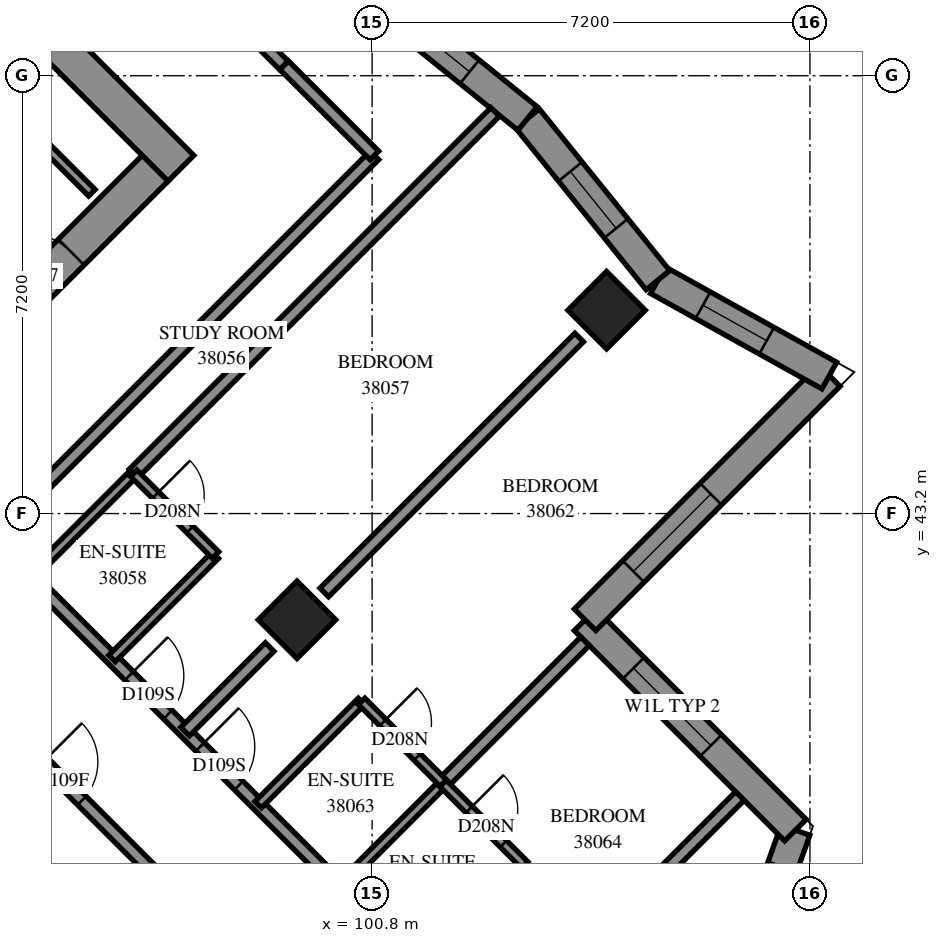
"""IFC4 building model, lengths in metres.
Left out: names, types, materials, properties, quantities, classifications, styles, units other than length and angle.
Written with IfcOpenShell. Run it as: python <this file> out.ifc"""

import sys

from ifc_helpers import new_model, si_unit, direction, frame, frame_2d, origin, origin_2d, place, context, subcontext, project, spatial, polyline, rectangle, outline, extrude, element, fill, save


model = new_model("IFC4")
c1 = context("Model", 3, precision=1e-05, world=origin(), true_north=direction((0.0, 1.0)))
c2 = subcontext(c1, "Body", "Model", "MODEL_VIEW")
j1 = project(units=[si_unit("LENGTHUNIT", "METRE"), si_unit("PLANEANGLEUNIT", "RADIAN")], contexts=[c1])
p1 = place(None, origin())
s1 = spatial("IfcSite", under=j1, at=p1, CompositionType="ELEMENT")
p2 = place(p1, origin())
s2 = spatial("IfcBuilding", under=s1, at=p2, CompositionType="ELEMENT")
p3 = place(p2, frame((0.0, 0.0, 142.2)))
s3 = spatial("IfcBuildingStorey", under=s2, at=p3, CompositionType="ELEMENT", Elevation=142.2)
for number, where, z_axis, x_axis in (
    (1, (104.656, 46.544, 0.0), (0.0, 0.0, 1.0), (0.707, -0.707, 0.0)),
    (2, (99.565, 41.453, 0.0), (0.0, 0.0, 1.0), (0.707, -0.707, 0.0)),
):
    element("IfcColumn", number, at=place(p3, frame(where, z_axis=z_axis, x_axis=x_axis)), inside=s3, PredefinedType="COLUMN", context=c2, shape_type="SweptSolid", body=[
        extrude(rectangle(XDim=0.9, YDim=0.9, at=origin_2d()), origin(), (0.0, 0.0, 1.0), 3.1),
    ])
p4 = place(p3, frame((86.625, 59.908, -0.3), z_axis=(0.0, 0.0, 1.0), x_axis=(0.7071067812, -0.7071067812, 0.0)))
e3 = element("IfcWall", 3, at=p4, inside=s3, PredefinedType="SHEAR", context=c2, shape_type="SweptSolid", body=[
    extrude(rectangle(XDim=15.6, YDim=0.6, at=frame_2d((7.8, 0.0))), origin(), (0.0, 0.0, 1.0), 2.7),
])
p5 = place(p4, frame((10.6, 0.0, 0.3)))
e4 = element("IfcOpeningElement", 4, at=p5, cuts=e3, PredefinedType="OPENING", context=c2, shape_type="SweptSolid", body=[
    extrude(rectangle(XDim=0.8, YDim=2.1, at=frame_2d((0.4, 1.05))), frame((0.0, 0.31, 0.0), z_axis=(0.0, -1.0, 0.0), x_axis=(1.0, 0.0, 0.0)), (0.0, 0.0, 1.0), 0.62),
])
p6 = place(p3, frame((87.049, 38.695, -0.3), z_axis=(0.0, 0.0, 1.0), x_axis=(0.7071067812, 0.7071067812, 0.0)))
e5 = element("IfcWall", 5, at=p6, inside=s3, PredefinedType="SHEAR", context=c2, shape_type="SweptSolid", body=[
    extrude(rectangle(XDim=14.4, YDim=0.6, at=frame_2d((7.2, 0.0))), origin(), (0.0, 0.0, 1.0), 2.7),
])
p7 = place(p6, frame((4.55, 0.0, 0.3)))
e6 = element("IfcOpeningElement", 6, at=p7, cuts=e5, PredefinedType="OPENING", context=c2, shape_type="SweptSolid", body=[
    extrude(rectangle(XDim=1.1, YDim=2.1, at=frame_2d((0.55, 1.05))), frame((0.0, 0.31, 0.0), z_axis=(0.0, -1.0, 0.0), x_axis=(1.0, 0.0, 0.0)), (0.0, 0.0, 1.0), 0.62),
])
p8 = place(p6, frame((11.35, 0.0, 0.3)))
e7 = element("IfcOpeningElement", 7, at=p8, cuts=e5, PredefinedType="OPENING", context=c2, shape_type="SweptSolid", body=[
    extrude(rectangle(XDim=1.1, YDim=2.1, at=frame_2d((0.55, 1.05))), frame((0.0, 0.31, 0.0), z_axis=(0.0, -1.0, 0.0), x_axis=(1.0, 0.0, 0.0)), (0.0, 0.0, 1.0), 0.62),
])
p9 = place(p3, frame((105.986, 32.989, 0.0), z_axis=(0.0, 0.0, 1.0), x_axis=(0.3344271092, 0.9424216194, 0.0)))
e8 = element("IfcWall", 8, at=p9, inside=s3, PredefinedType="SOLIDWALL", context=c2, shape_type="SweptSolid", body=[
    extrude(outline(polyline([(-0.114, -0.25), (5.468, -0.25), (5.153, 0.25), (0.114, 0.25), (-0.114, -0.25)])), origin(), (0.0, 0.0, 1.0), 3.1),
])
p10 = place(p9, frame((1.155, 0.0, 0.45)))
e9 = element("IfcOpeningElement", 9, at=p10, cuts=e8, PredefinedType="OPENING", context=c2, shape_type="SweptSolid", body=[
    extrude(rectangle(XDim=1.2, YDim=2.5, at=frame_2d((0.6, 1.25))), frame((0.0, 0.26, 0.0), z_axis=(0.0, -1.0, 0.0), x_axis=(1.0, 0.0, 0.0)), (0.0, 0.0, 1.0), 0.52),
])
p11 = place(p9, frame((3.474, 0.0, 0.45)))
e10 = element("IfcOpeningElement", 10, at=p11, cuts=e8, PredefinedType="OPENING", context=c2, shape_type="SweptSolid", body=[
    extrude(rectangle(XDim=1.2, YDim=2.5, at=frame_2d((0.6, 1.25))), frame((0.0, 0.26, 0.0), z_axis=(0.0, -1.0, 0.0), x_axis=(1.0, 0.0, 0.0)), (0.0, 0.0, 1.0), 0.52),
])
p12 = place(p3, frame((107.762, 37.994, 0.0), z_axis=(0.0, 0.0, 1.0), x_axis=(-0.7071170013, 0.7070965609, 0.0)))
e11 = element("IfcWall", 11, at=p12, inside=s3, PredefinedType="SOLIDWALL", context=c2, shape_type="SweptSolid", body=[
    extrude(outline(polyline([(-0.158, -0.25), (4.642, -0.25), (5.142, 0.25), (0.158, 0.25), (-0.158, -0.25)])), origin(), (0.0, 0.0, 1.0), 3.1),
])
p13 = place(p12, frame((1.967, 0.0, 0.6)))
e12 = element("IfcOpeningElement", 12, at=p13, cuts=e11, PredefinedType="OPENING", context=c2, shape_type="SweptSolid", body=[
    extrude(rectangle(XDim=1.8, YDim=1.9, at=frame_2d((0.9, 0.95))), frame((0.0, 0.26, 0.0), z_axis=(0.0, -1.0, 0.0), x_axis=(1.0, 0.0, 0.0)), (0.0, 0.0, 1.0), 0.52),
])
p14 = place(p3, frame((104.302, 41.453, 0.0), z_axis=(0.0, 0.0, 1.0), x_axis=(0.707115584, 0.7070979783, 0.0)))
e13 = element("IfcWall", 13, at=p14, inside=s3, PredefinedType="SOLIDWALL", context=c2, shape_type="SweptSolid", body=[
    extrude(outline(polyline([(0.25, -0.25), (6.011, -0.25), (5.349, 0.25), (-0.25, 0.25), (0.25, -0.25)])), origin(), (0.0, 0.0, 1.0), 3.1),
])
p15 = place(p14, frame((1.125, 0.0, 0.6)))
e14 = element("IfcOpeningElement", 14, at=p15, cuts=e13, PredefinedType="OPENING", context=c2, shape_type="SweptSolid", body=[
    extrude(rectangle(XDim=1.8, YDim=1.9, at=frame_2d((0.9, 0.95))), frame((0.0, 0.26, 0.0), z_axis=(0.0, -1.0, 0.0), x_axis=(1.0, 0.0, 0.0)), (0.0, 0.0, 1.0), 0.52),
])
p16 = place(p3, frame((108.319, 45.469, 0.0), z_axis=(0.0, 0.0, 1.0), x_axis=(-0.8737431929, 0.4863875336, 0.0)))
e15 = element("IfcWall", 15, at=p16, inside=s3, PredefinedType="SOLIDWALL", context=c2, shape_type="SweptSolid", body=[
    extrude(outline(polyline([(-0.331, -0.25), (3.178, -0.25), (3.275, 0.25), (0.331, 0.25), (-0.331, -0.25)])), origin(), (0.0, 0.0, 1.0), 3.1),
])
p17 = place(p16, frame((1.179, 0.0, 0.45)))
e16 = element("IfcOpeningElement", 16, at=p17, cuts=e15, PredefinedType="OPENING", context=c2, shape_type="SweptSolid", body=[
    extrude(rectangle(XDim=1.2, YDim=2.5, at=frame_2d((0.6, 1.25))), frame((0.0, 0.26, 0.0), z_axis=(0.0, -1.0, 0.0), x_axis=(1.0, 0.0, 0.0)), (0.0, 0.0, 1.0), 0.52),
])
p18 = place(p3, frame((105.5, 47.038, 0.0), z_axis=(0.0, 0.0, 1.0), x_axis=(-0.6278674651, 0.7783202723, 0.0)))
e17 = element("IfcWall", 17, at=p18, inside=s3, PredefinedType="SOLIDWALL", context=c2, shape_type="SweptSolid", body=[
    extrude(outline(polyline([(0.049, -0.25), (3.442, -0.25), (3.389, 0.25), (-0.049, 0.25), (0.049, -0.25)])), origin(), (0.0, 0.0, 1.0), 3.1),
])
p19 = place(p18, frame((1.095, 0.0, 0.45)))
e18 = element("IfcOpeningElement", 18, at=p19, cuts=e17, PredefinedType="OPENING", context=c2, shape_type="SweptSolid", body=[
    extrude(rectangle(XDim=1.2, YDim=2.5, at=frame_2d((0.6, 1.25))), frame((0.0, 0.26, 0.0), z_axis=(0.0, -1.0, 0.0), x_axis=(1.0, 0.0, 0.0)), (0.0, 0.0, 1.0), 0.52),
])
p20 = place(p3, frame((103.355, 49.697, 0.0), z_axis=(0.0, 0.0, 1.0), x_axis=(-0.7783182818, 0.6278699325, 0.0)))
e19 = element("IfcWall", 19, at=p20, inside=s3, PredefinedType="SOLIDWALL", context=c2, shape_type="SweptSolid", body=[
    extrude(outline(polyline([(-0.027, -0.25), (3.367, -0.25), (3.421, 0.25), (0.027, 0.25), (-0.027, -0.25)])), origin(), (0.0, 0.0, 1.0), 3.1),
])
p21 = place(p20, frame((1.224, 0.0, 0.45)))
e20 = element("IfcOpeningElement", 20, at=p21, cuts=e19, PredefinedType="OPENING", context=c2, shape_type="SweptSolid", body=[
    extrude(rectangle(XDim=1.2, YDim=2.5, at=frame_2d((0.6, 1.25))), frame((0.0, 0.26, 0.0), z_axis=(0.0, -1.0, 0.0), x_axis=(1.0, 0.0, 0.0)), (0.0, 0.0, 1.0), 0.52),
])
p22 = place(p3, frame((91.313, 53.354, 0.0), z_axis=(0.0, 0.0, 1.0), x_axis=(0.7071140275, -0.7070995348, 0.0)))
e21 = element("IfcWall", 21, at=p22, inside=s3, PredefinedType="PARTITIONING", context=c2, shape_type="SweptSolid", body=[
    extrude(rectangle(XDim=6.9, YDim=0.15, at=frame_2d((3.45, 0.0))), origin(), (0.0, 0.0, 1.0), 3.1),
])
p23 = place(p3, frame((93.127, 41.379, 0.0), z_axis=(0.0, 0.0, 1.0), x_axis=(0.7071067812, -0.7071067812, 0.0)))
e22 = element("IfcWall", 22, at=p23, inside=s3, PredefinedType="PARTITIONING", context=c2, shape_type="SweptSolid", body=[
    extrude(rectangle(XDim=9.39, YDim=0.2, at=frame_2d((4.695, 0.0))), origin(), (0.0, 0.0, 1.0), 3.1),
])
p24 = place(p23, frame((3.2, 0.0, 0.0)))
e23 = element("IfcOpeningElement", 23, at=p24, cuts=e22, PredefinedType="OPENING", context=c2, shape_type="SweptSolid", body=[
    extrude(rectangle(XDim=0.9, YDim=2.1, at=frame_2d((0.45, 1.05))), frame((0.0, 0.11, 0.0), z_axis=(0.0, -1.0, 0.0), x_axis=(1.0, 0.0, 0.0)), (0.0, 0.0, 1.0), 0.22),
])
p25 = place(p3, frame((94.543, 42.797, 0.0), z_axis=(0.0, 0.0, 1.0), x_axis=(0.7071067812, 0.7071067812, 0.0)))
e24 = element("IfcWall", 24, at=p25, inside=s3, PredefinedType="PARTITIONING", context=c2, shape_type="SweptSolid", body=[
    extrude(rectangle(XDim=8.901, YDim=0.2, at=frame_2d((4.45, 0.0))), origin(), (0.0, 0.0, 1.0), 3.1),
])
p26 = place(p25, frame((0.193, 0.0, 0.0)))
e25 = element("IfcOpeningElement", 25, at=p26, cuts=e24, PredefinedType="OPENING", context=c2, shape_type="SweptSolid", body=[
    extrude(rectangle(XDim=1.0, YDim=2.1, at=frame_2d((0.5, 1.05))), frame((0.0, 0.11, 0.0), z_axis=(0.0, -1.0, 0.0), x_axis=(1.0, 0.0, 0.0)), (0.0, 0.0, 1.0), 0.22),
])
p27 = place(p3, frame((95.177, 42.157, 0.0), z_axis=(0.0, 0.0, 1.0), x_axis=(0.7071067812, -0.7071067812, 0.0)))
e26 = element("IfcWall", 26, at=p27, inside=s3, PredefinedType="PARTITIONING", context=c2, shape_type="SweptSolid", body=[
    extrude(rectangle(XDim=8.491, YDim=0.2, at=frame_2d((4.245, 0.0))), origin(), (0.0, 0.0, 1.0), 3.1),
])
p28 = place(p27, frame((2.3, 0.0, 0.0)))
e27 = element("IfcOpeningElement", 27, at=p28, cuts=e26, PredefinedType="OPENING", context=c2, shape_type="SweptSolid", body=[
    extrude(rectangle(XDim=0.9, YDim=2.1, at=frame_2d((0.45, 1.05))), frame((0.0, 0.11, 0.0), z_axis=(0.0, -1.0, 0.0), x_axis=(1.0, 0.0, 0.0)), (0.0, 0.0, 1.0), 0.22),
])
p29 = place(p27, frame((3.95, 0.0, 0.0)))
e28 = element("IfcOpeningElement", 28, at=p29, cuts=e26, PredefinedType="OPENING", context=c2, shape_type="SweptSolid", body=[
    extrude(rectangle(XDim=0.9, YDim=2.1, at=frame_2d((0.45, 1.05))), frame((0.0, 0.11, 0.0), z_axis=(0.0, -1.0, 0.0), x_axis=(1.0, 0.0, 0.0)), (0.0, 0.0, 1.0), 0.22),
])
p30 = place(p3, frame((96.877, 43.859, 0.0), z_axis=(0.0, 0.0, 1.0), x_axis=(0.7071127272, 0.7071008351, 0.0)))
e29 = element("IfcWall", 29, at=p30, inside=s3, PredefinedType="PARTITIONING", context=c2, shape_type="SweptSolid", body=[
    extrude(rectangle(XDim=8.409, YDim=0.2, at=frame_2d((4.205, 0.0))), origin(), (0.0, 0.0, 1.0), 3.1),
])
p31 = place(p3, frame((100.013, 41.903, 0.0), z_axis=(0.0, 0.0, 1.0), x_axis=(0.7071067812, 0.7071067812, 0.0)))
e30 = element("IfcWall", 30, at=p31, inside=s3, PredefinedType="PARTITIONING", context=c2, shape_type="SweptSolid", body=[
    extrude(rectangle(XDim=5.928, YDim=0.2, at=frame_2d((2.964, 0.0))), origin(), (0.0, 0.0, 1.0), 3.1),
])
p32 = place(p3, frame((101.968, 38.766, 0.0), z_axis=(0.0, 0.0, 1.0), x_axis=(0.7071067812, 0.7071067812, 0.0)))
e31 = element("IfcWall", 31, at=p32, inside=s3, PredefinedType="PARTITIONING", context=c2, shape_type="SweptSolid", body=[
    extrude(rectangle(XDim=3.3, YDim=0.2, at=frame_2d((1.65, 0.0))), origin(), (0.0, 0.0, 1.0), 3.1),
])
p33 = place(p3, frame((105.105, 36.813, 0.0), z_axis=(0.0, 0.0, 1.0), x_axis=(0.7071067812, 0.7071067812, 0.0)))
e32 = element("IfcWall", 32, at=p33, inside=s3, PredefinedType="PARTITIONING", context=c2, shape_type="SweptSolid", body=[
    extrude(rectangle(XDim=2.463, YDim=0.2, at=frame_2d((1.232, 0.0))), origin(), (0.0, 0.0, 1.0), 3.1),
])
for number, where, z_axis, x_axis in (
    (33, (96.523, 40.817, 0.0), (0.0, 0.0, 1.0), (0.707, 0.707, 0.0)),
    (34, (98.927, 38.413, 0.0), (0.0, 0.0, 1.0), (0.707, 0.707, 0.0)),
    (35, (95.179, 42.161, 0.0), (0.0, 0.0, 1.0), (0.707, 0.707, 0.0)),
):
    element("IfcWall", number, at=place(p3, frame(where, z_axis=z_axis, x_axis=x_axis)), inside=s3, PredefinedType="PARTITIONING", context=c2, shape_type="SweptSolid", body=[
        extrude(rectangle(XDim=2.401, YDim=0.15, at=frame_2d((1.201, 0.0))), origin(), (0.0, 0.0, 1.0), 3.1),
    ])
p34 = place(p3, frame((100.273, 37.067, 0.0), z_axis=(0.0, 0.0, 1.0), x_axis=(0.706689978, 0.7075233388, 0.0)))
e36 = element("IfcWall", 36, at=p34, inside=s3, PredefinedType="PARTITIONING", context=c2, shape_type="SweptSolid", body=[
    extrude(rectangle(XDim=2.4, YDim=0.15, at=frame_2d((1.2, 0.0))), origin(), (0.0, 0.0, 1.0), 3.1),
])
p35 = place(p3, frame((101.615, 35.727, 0.0), z_axis=(0.0, 0.0, 1.0), x_axis=(0.7071067812, 0.7071067812, 0.0)))
e37 = element("IfcWall", 37, at=p35, inside=s3, PredefinedType="PARTITIONING", context=c2, shape_type="SweptSolid", body=[
    extrude(rectangle(XDim=2.398, YDim=0.15, at=frame_2d((1.199, 0.0))), origin(), (0.0, 0.0, 1.0), 3.1),
])
p36 = place(p3, frame((99.352, 50.574, 0.0), z_axis=(0.0, 0.0, 1.0), x_axis=(0.7075827869, -0.7066304548, 0.0)))
e38 = element("IfcWall", 38, at=p36, inside=s3, PredefinedType="PARTITIONING", context=c2, shape_type="SweptSolid", body=[
    extrude(rectangle(XDim=2.1, YDim=0.2, at=frame_2d((1.05, 0.0))), origin(), (0.0, 0.0, 1.0), 3.1),
])
p37 = place(p3, frame((97.725, 39.615, 0.0), z_axis=(0.0, 0.0, 1.0), x_axis=(0.7071067812, 0.7071067812, 0.0)))
e39 = element("IfcWall", 39, at=p37, inside=s3, PredefinedType="PARTITIONING", context=c2, shape_type="SweptSolid", body=[
    extrude(rectangle(XDim=1.966, YDim=0.2, at=frame_2d((0.983, 0.0))), origin(), (0.0, 0.0, 1.0), 3.1),
])
p38 = place(p3, frame((96.881, 43.861, 0.0), z_axis=(0.0, 0.0, 1.0), x_axis=(0.7071067812, -0.7071067812, 0.0)))
e40 = element("IfcWall", 40, at=p38, inside=s3, PredefinedType="PARTITIONING", context=c2, shape_type="SweptSolid", body=[
    extrude(rectangle(XDim=1.901, YDim=0.15, at=frame_2d((0.95, 0.0))), origin(), (0.0, 0.0, 1.0), 3.1),
])
p39 = place(p38, frame((0.505, 0.0, 0.0)))
e41 = element("IfcOpeningElement", 41, at=p39, cuts=e40, PredefinedType="OPENING", context=c2, shape_type="SweptSolid", body=[
    extrude(rectangle(XDim=0.8, YDim=2.1, at=frame_2d((0.4, 1.05))), frame((0.0, 0.085, 0.0), z_axis=(0.0, -1.0, 0.0), x_axis=(1.0, 0.0, 0.0)), (0.0, 0.0, 1.0), 0.17),
])
p40 = place(p3, frame((101.965, 38.763, 0.0), z_axis=(0.0, 0.0, 1.0), x_axis=(0.7071067812, -0.7071067812, 0.0)))
e42 = element("IfcWall", 42, at=p40, inside=s3, PredefinedType="PARTITIONING", context=c2, shape_type="SweptSolid", body=[
    extrude(rectangle(XDim=1.901, YDim=0.15, at=frame_2d((0.95, 0.0))), origin(), (0.0, 0.0, 1.0), 3.1),
])
p41 = place(p40, frame((0.608, 0.0, 0.0)))
e43 = element("IfcOpeningElement", 43, at=p41, cuts=e42, PredefinedType="OPENING", context=c2, shape_type="SweptSolid", body=[
    extrude(rectangle(XDim=0.8, YDim=2.1, at=frame_2d((0.4, 1.05))), frame((0.0, 0.085, 0.0), z_axis=(0.0, -1.0, 0.0), x_axis=(1.0, 0.0, 0.0)), (0.0, 0.0, 1.0), 0.17),
])
p42 = place(p3, frame((100.628, 40.112, 0.0), z_axis=(0.0, 0.0, 1.0), x_axis=(0.7065800724, -0.7076330979, 0.0)))
e44 = element("IfcWall", 44, at=p42, inside=s3, PredefinedType="PARTITIONING", context=c2, shape_type="SweptSolid", body=[
    extrude(rectangle(XDim=1.899, YDim=0.15, at=frame_2d((0.95, 0.0))), origin(), (0.0, 0.0, 1.0), 3.1),
])
p43 = place(p42, frame((0.493, 0.0, 0.0)))
e45 = element("IfcOpeningElement", 45, at=p43, cuts=e44, PredefinedType="OPENING", context=c2, shape_type="SweptSolid", body=[
    extrude(rectangle(XDim=0.8, YDim=2.1, at=frame_2d((0.4, 1.05))), frame((0.0, 0.085, 0.0), z_axis=(0.0, -1.0, 0.0), x_axis=(1.0, 0.0, 0.0)), (0.0, 0.0, 1.0), 0.17),
])
p44 = place(p3, frame((98.925, 50.995, 0.0), z_axis=(0.0, 0.0, 1.0), x_axis=(0.7071067812, -0.7071067812, 0.0)))
e46 = element("IfcWall", 46, at=p44, inside=s3, PredefinedType="PARTITIONING", context=c2, shape_type="SweptSolid", body=[
    extrude(rectangle(XDim=0.6, YDim=0.2, at=frame_2d((0.3, 0.0))), origin(), (0.0, 0.0, 1.0), 3.1),
])
p45 = place(p11, origin())
e47 = element("IfcWindow", 47, at=p45, inside=s3, PartitioningType="SINGLE_PANEL", PredefinedType="WINDOW", context=c2, shape_type="SweptSolid", body=[
    extrude(rectangle(XDim=1.2, YDim=2.5, at=frame_2d((0.6, 1.25))), frame((0.0, 0.18, 0.0), z_axis=(0.0, -1.0, 0.0), x_axis=(1.0, 0.0, 0.0)), (0.0, 0.0, 1.0), 0.06),
])
fill(e10, e47)
p46 = place(p13, origin())
e48 = element("IfcWindow", 48, at=p46, inside=s3, PartitioningType="SINGLE_PANEL", PredefinedType="WINDOW", context=c2, shape_type="SweptSolid", body=[
    extrude(rectangle(XDim=1.8, YDim=1.9, at=frame_2d((0.9, 0.95))), frame((0.0, 0.18, 0.0), z_axis=(0.0, -1.0, 0.0), x_axis=(1.0, 0.0, 0.0)), (0.0, 0.0, 1.0), 0.06),
])
fill(e12, e48)
p47 = place(p15, origin())
e49 = element("IfcWindow", 49, at=p47, inside=s3, PartitioningType="SINGLE_PANEL", PredefinedType="WINDOW", context=c2, shape_type="SweptSolid", body=[
    extrude(rectangle(XDim=1.8, YDim=1.9, at=frame_2d((0.9, 0.95))), frame((0.0, 0.18, 0.0), z_axis=(0.0, -1.0, 0.0), x_axis=(1.0, 0.0, 0.0)), (0.0, 0.0, 1.0), 0.06),
])
fill(e14, e49)
p48 = place(p17, origin())
e50 = element("IfcWindow", 50, at=p48, inside=s3, PartitioningType="SINGLE_PANEL", PredefinedType="WINDOW", context=c2, shape_type="SweptSolid", body=[
    extrude(rectangle(XDim=1.2, YDim=2.5, at=frame_2d((0.6, 1.25))), frame((0.0, 0.18, 0.0), z_axis=(0.0, -1.0, 0.0), x_axis=(1.0, 0.0, 0.0)), (0.0, 0.0, 1.0), 0.06),
])
fill(e16, e50)
p49 = place(p19, origin())
e51 = element("IfcWindow", 51, at=p49, inside=s3, PartitioningType="SINGLE_PANEL", PredefinedType="WINDOW", context=c2, shape_type="SweptSolid", body=[
    extrude(rectangle(XDim=1.2, YDim=2.5, at=frame_2d((0.6, 1.25))), frame((0.0, 0.18, 0.0), z_axis=(0.0, -1.0, 0.0), x_axis=(1.0, 0.0, 0.0)), (0.0, 0.0, 1.0), 0.06),
])
fill(e18, e51)
p50 = place(p21, origin())
e52 = element("IfcWindow", 52, at=p50, inside=s3, PartitioningType="SINGLE_PANEL", PredefinedType="WINDOW", context=c2, shape_type="SweptSolid", body=[
    extrude(rectangle(XDim=1.2, YDim=2.5, at=frame_2d((0.6, 1.25))), frame((0.0, 0.18, 0.0), z_axis=(0.0, -1.0, 0.0), x_axis=(1.0, 0.0, 0.0)), (0.0, 0.0, 1.0), 0.06),
])
fill(e20, e52)
p51 = place(p8, origin())
e53 = element("IfcDoor", 53, at=p51, inside=s3, OperationType="SINGLE_SWING_RIGHT", PredefinedType="DOOR", context=c2, shape_type="SweptSolid", body=[
    extrude(rectangle(XDim=1.1, YDim=2.1, at=frame_2d((0.55, 1.05))), frame((0.0, 0.025, 0.0), z_axis=(0.0, -1.0, 0.0), x_axis=(1.0, 0.0, 0.0)), (0.0, 0.0, 1.0), 0.05),
])
fill(e7, e53)
p52 = place(p28, origin())
e54 = element("IfcDoor", 54, at=p52, inside=s3, OperationType="SINGLE_SWING_RIGHT", PredefinedType="DOOR", context=c2, shape_type="SweptSolid", body=[
    extrude(rectangle(XDim=0.9, YDim=2.1, at=frame_2d((0.45, 1.05))), frame((0.0, 0.025, 0.0), z_axis=(0.0, -1.0, 0.0), x_axis=(1.0, 0.0, 0.0)), (0.0, 0.0, 1.0), 0.05),
])
fill(e27, e54)
p53 = place(p39, origin())
e55 = element("IfcDoor", 55, at=p53, inside=s3, OperationType="SINGLE_SWING_RIGHT", PredefinedType="DOOR", context=c2, shape_type="SweptSolid", body=[
    extrude(rectangle(XDim=0.8, YDim=2.1, at=frame_2d((0.4, 1.05))), frame((0.0, 0.025, 0.0), z_axis=(0.0, -1.0, 0.0), x_axis=(1.0, 0.0, 0.0)), (0.0, 0.0, 1.0), 0.05),
])
fill(e41, e55)
p54 = place(p24, origin())
e56 = element("IfcDoor", 56, at=p54, inside=s3, OperationType="SINGLE_SWING_LEFT", PredefinedType="DOOR", context=c2, shape_type="SweptSolid", body=[
    extrude(rectangle(XDim=0.9, YDim=2.1, at=frame_2d((0.45, 1.05))), frame((0.0, 0.025, 0.0), z_axis=(0.0, -1.0, 0.0), x_axis=(1.0, 0.0, 0.0)), (0.0, 0.0, 1.0), 0.05),
])
fill(e23, e56)
p55 = place(p29, origin())
e57 = element("IfcDoor", 57, at=p55, inside=s3, OperationType="SINGLE_SWING_LEFT", PredefinedType="DOOR", context=c2, shape_type="SweptSolid", body=[
    extrude(rectangle(XDim=0.9, YDim=2.1, at=frame_2d((0.45, 1.05))), frame((0.0, 0.025, 0.0), z_axis=(0.0, -1.0, 0.0), x_axis=(1.0, 0.0, 0.0)), (0.0, 0.0, 1.0), 0.05),
])
fill(e28, e57)
p56 = place(p43, origin())
e58 = element("IfcDoor", 58, at=p56, inside=s3, OperationType="SINGLE_SWING_RIGHT", PredefinedType="DOOR", context=c2, shape_type="SweptSolid", body=[
    extrude(rectangle(XDim=0.8, YDim=2.1, at=frame_2d((0.4, 1.05))), frame((0.0, 0.025, 0.0), z_axis=(0.0, -1.0, 0.0), x_axis=(1.0, 0.0, 0.0)), (0.0, 0.0, 1.0), 0.05),
])
fill(e45, e58)
p57 = place(p41, origin())
e59 = element("IfcDoor", 59, at=p57, inside=s3, OperationType="SINGLE_SWING_RIGHT", PredefinedType="DOOR", context=c2, shape_type="SweptSolid", body=[
    extrude(rectangle(XDim=0.8, YDim=2.1, at=frame_2d((0.4, 1.05))), frame((0.0, 0.025, 0.0), z_axis=(0.0, -1.0, 0.0), x_axis=(1.0, 0.0, 0.0)), (0.0, 0.0, 1.0), 0.05),
])
fill(e43, e59)
save(model, sys.argv[1])
